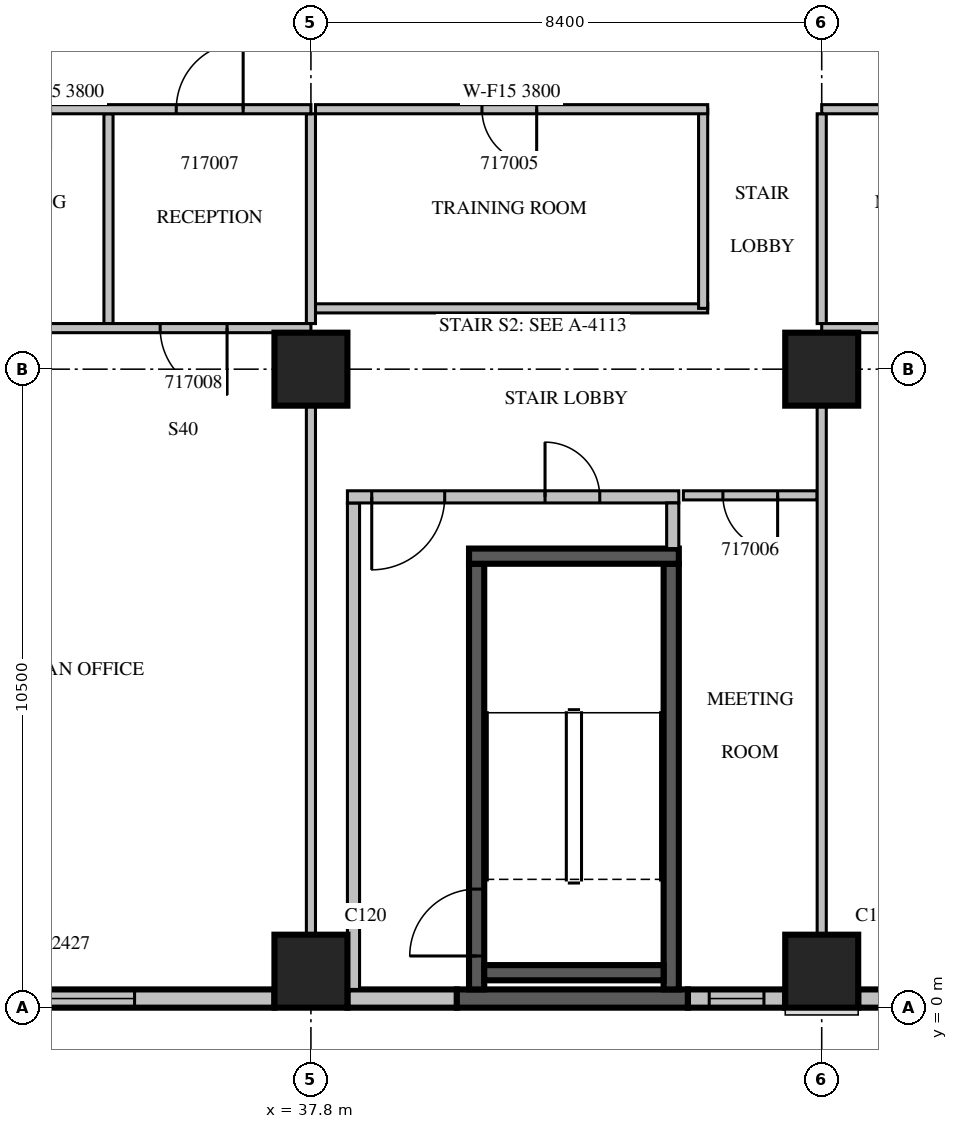
"""IFC4 building model, lengths in metres.
Left out: names, types, materials, properties, quantities, classifications, styles, units other than length and angle.
Written with IfcOpenShell. Run it as: python <this file> out.ifc"""

import sys

from ifc_helpers import new_model, si_unit, direction, frame, frame_2d, origin, origin_2d, place, context, subcontext, project, spatial, rectangle, extrude, source, transform, mapped, element, fill, save


model = new_model("IFC4")
c1 = context("Model", 3, precision=1e-05, world=origin(), true_north=direction((0.0, 1.0)))
c2 = subcontext(c1, "Body", "Model", "MODEL_VIEW")
j1 = project(units=[si_unit("LENGTHUNIT", "METRE"), si_unit("PLANEANGLEUNIT", "RADIAN")], contexts=[c1])
p1 = place(None, origin())
s1 = spatial("IfcSite", under=j1, at=p1, CompositionType="ELEMENT")
p2 = place(p1, origin())
s2 = spatial("IfcBuilding", under=s1, at=p2, CompositionType="ELEMENT")
p3 = place(p2, frame((0.0, 0.0, 82.5)))
s3 = spatial("IfcBuildingStorey", under=s2, at=p3, CompositionType="ELEMENT", Elevation=82.5)
m1 = source(origin(), c2, "Body", "SweptSolid", [
    extrude(rectangle(XDim=1.2, YDim=1.2, at=origin_2d()), origin(), (0.0, 0.0, 1.0), 4.2),
])
for number, where, z_axis, x_axis in (
    (1, (37.8, 0.6, 0.0), (0.0, 0.0, 1.0), (1.0, 0.0, 0.0)),
    (2, (46.2, 0.6, 0.0), (0.0, 0.0, 1.0), (1.0, 0.0, 0.0)),
    (3, (37.8, 10.5, 0.0), (0.0, 0.0, 1.0), (1.0, 0.0, 0.0)),
    (4, (46.2, 10.5, 0.0), (0.0, 0.0, 1.0), (1.0, 0.0, 0.0)),
):
    element("IfcColumn", number, at=place(p3, frame(where, z_axis=z_axis, x_axis=x_axis)), inside=s3, PredefinedType="COLUMN", context=c2, shape_type="MappedRepresentation", body=[
        mapped(m1, transform((0.0, 0.0, 0.0), scale=1.0)),
    ])
m2 = source(origin(), c2, "Body", "SweptSolid", [
    extrude(rectangle(XDim=7.2, YDim=0.3, at=frame_2d((3.6, 0.0))), origin(), (0.0, 0.0, 1.0), 3.8),
])
p4 = place(p3, frame((30.0, 0.15, 0.0), z_axis=(0.0, 0.0, 1.0), x_axis=(1.0, 0.0, 0.0)))
e5 = element("IfcWall", 5, at=p4, inside=s3, PredefinedType="STANDARD", context=c2, shape_type="MappedRepresentation", body=[
    mapped(m2, transform((0.0, 0.0, 0.0), scale=1.0)),
])
m3 = source(origin(), c2, "Body", "SweptSolid", [
    extrude(rectangle(XDim=2.4, YDim=2.7, at=frame_2d((1.2, 1.35))), frame((0.0, 0.16, 0.0), z_axis=(0.0, -1.0, 0.0), x_axis=(1.0, 0.0, 0.0)), (0.0, 0.0, 1.0), 0.32),
])
p5 = place(p4, frame((2.5, 0.0, 0.6)))
e6 = element("IfcOpeningElement", 6, at=p5, cuts=e5, PredefinedType="OPENING", context=c2, shape_type="MappedRepresentation", body=[
    mapped(m3, transform((0.0, 0.0, 0.0), scale=1.0)),
])
m4 = source(origin(), c2, "Body", "SweptSolid", [
    extrude(rectangle(XDim=1.8, YDim=0.3, at=frame_2d((0.9, 0.0))), origin(), (0.0, 0.0, 1.0), 3.8),
])
p6 = place(p3, frame((38.4, 0.15, 0.0), z_axis=(0.0, 0.0, 1.0), x_axis=(1.0, 0.0, 0.0)))
e7 = element("IfcWall", 7, at=p6, inside=s3, PredefinedType="STANDARD", context=c2, shape_type="MappedRepresentation", body=[
    mapped(m4, transform((0.0, 0.0, 0.0), scale=1.0)),
])
m5 = source(origin(), c2, "Body", "SweptSolid", [
    extrude(rectangle(XDim=3.8, YDim=0.3, at=frame_2d((1.9, 0.0))), origin(), (0.0, 0.0, 1.0), 3.8),
])
p7 = place(p3, frame((40.2, 0.15, 0.0), z_axis=(0.0, 0.0, 1.0), x_axis=(1.0, 0.0, 0.0)))
e8 = element("IfcWall", 8, at=p7, inside=s3, PredefinedType="SOLIDWALL", context=c2, shape_type="MappedRepresentation", body=[
    mapped(m5, transform((0.0, 0.0, 0.0), scale=1.0)),
])
m6 = source(origin(), c2, "Body", "SweptSolid", [
    extrude(rectangle(XDim=1.6, YDim=0.3, at=frame_2d((0.8, 0.0))), origin(), (0.0, 0.0, 1.0), 3.8),
])
p8 = place(p3, frame((44.0, 0.15, 0.0), z_axis=(0.0, 0.0, 1.0), x_axis=(1.0, 0.0, 0.0)))
e9 = element("IfcWall", 9, at=p8, inside=s3, PredefinedType="STANDARD", context=c2, shape_type="MappedRepresentation", body=[
    mapped(m6, transform((0.0, 0.0, 0.0), scale=1.0)),
])
m7 = source(origin(), c2, "Body", "SweptSolid", [
    extrude(rectangle(XDim=0.9, YDim=2.7, at=frame_2d((0.45, 1.35))), frame((0.0, 0.16, 0.0), z_axis=(0.0, -1.0, 0.0), x_axis=(1.0, 0.0, 0.0)), (0.0, 0.0, 1.0), 0.32),
])
p9 = place(p8, frame((0.35, 0.0, 0.6)))
e10 = element("IfcOpeningElement", 10, at=p9, cuts=e9, PredefinedType="OPENING", context=c2, shape_type="MappedRepresentation", body=[
    mapped(m7, transform((0.0, 0.0, 0.0), scale=1.0)),
])
m8 = source(origin(), c2, "Body", "SweptSolid", [
    extrude(rectangle(XDim=4.68, YDim=0.3, at=frame_2d((2.34, 0.0))), origin(), (0.0, 0.0, 1.0), 3.8),
])
p10 = place(p3, frame((46.8, 0.15, 0.0), z_axis=(0.0, 0.0, 1.0), x_axis=(1.0, 0.0, 0.0)))
e11 = element("IfcWall", 11, at=p10, inside=s3, PredefinedType="STANDARD", context=c2, shape_type="MappedRepresentation", body=[
    mapped(m8, transform((0.0, 0.0, 0.0), scale=1.0)),
])
m9 = source(origin(), c2, "Body", "SweptSolid", [
    extrude(rectangle(XDim=3.6, YDim=2.7, at=frame_2d((1.8, 1.35))), frame((0.0, 0.16, 0.0), z_axis=(0.0, -1.0, 0.0), x_axis=(1.0, 0.0, 0.0)), (0.0, 0.0, 1.0), 0.32),
])
p11 = place(p10, frame((0.54, 0.0, 0.6)))
e12 = element("IfcOpeningElement", 12, at=p11, cuts=e11, PredefinedType="OPENING", context=c2, shape_type="MappedRepresentation", body=[
    mapped(m9, transform((0.0, 0.0, 0.0), scale=1.0)),
])
m10 = source(origin(), c2, "Body", "SweptSolid", [
    extrude(rectangle(XDim=7.0, YDim=0.25, at=frame_2d((3.5, 0.0))), origin(), (0.0, 0.0, 1.0), 3.8),
])
p12 = place(p3, frame((40.525, 0.3, 0.0), z_axis=(0.0, 0.0, 1.0), x_axis=(0.0, 1.0, 0.0)))
e13 = element("IfcWall", 13, at=p12, inside=s3, PredefinedType="SOLIDWALL", context=c2, shape_type="MappedRepresentation", body=[
    mapped(m10, transform((0.0, 0.0, 0.0), scale=1.0)),
])
m11 = source(origin(), c2, "Body", "SweptSolid", [
    extrude(rectangle(XDim=1.1, YDim=2.1, at=frame_2d((0.55, 1.05))), frame((0.0, 0.135, 0.0), z_axis=(0.0, -1.0, 0.0), x_axis=(1.0, 0.0, 0.0)), (0.0, 0.0, 1.0), 0.27),
])
p13 = place(p12, frame((0.55, 0.0, 0.0)))
e14 = element("IfcOpeningElement", 14, at=p13, cuts=e13, PredefinedType="OPENING", context=c2, shape_type="MappedRepresentation", body=[
    mapped(m11, transform((0.0, 0.0, 0.0), scale=1.0)),
])
p14 = place(p3, frame((43.725, 0.3, 0.0), z_axis=(0.0, 0.0, 1.0), x_axis=(0.0, 1.0, 0.0)))
e15 = element("IfcWall", 15, at=p14, inside=s3, PredefinedType="SOLIDWALL", context=c2, shape_type="MappedRepresentation", body=[
    mapped(m10, transform((0.0, 0.0, 0.0), scale=1.0)),
])
m12 = source(origin(), c2, "Body", "SweptSolid", [
    extrude(rectangle(XDim=3.45, YDim=0.25, at=frame_2d((1.725, 0.0))), origin(), (0.0, 0.0, 1.0), 3.8),
])
p15 = place(p3, frame((40.4, 7.425, 0.0), z_axis=(0.0, 0.0, 1.0), x_axis=(1.0, 0.0, 0.0)))
e16 = element("IfcWall", 16, at=p15, inside=s3, PredefinedType="SOLIDWALL", context=c2, shape_type="MappedRepresentation", body=[
    mapped(m12, transform((0.0, 0.0, 0.0), scale=1.0)),
])
m13 = source(origin(), c2, "Body", "SweptSolid", [
    extrude(rectangle(XDim=2.95, YDim=0.25, at=frame_2d((1.475, 0.0))), origin(), (0.0, 0.0, 1.0), 3.8),
])
p16 = place(p3, frame((40.65, 0.575, 0.0), z_axis=(0.0, 0.0, 1.0), x_axis=(1.0, 0.0, 0.0)))
e17 = element("IfcWall", 17, at=p16, inside=s3, PredefinedType="SOLIDWALL", context=c2, shape_type="MappedRepresentation", body=[
    mapped(m13, transform((0.0, 0.0, 0.0), scale=1.0)),
])
m14 = source(origin(), c2, "Body", "SweptSolid", [
    extrude(rectangle(XDim=8.0, YDim=0.2, at=frame_2d((4.0, 0.0))), origin(), (0.0, 0.0, 1.0), 3.8),
])
p17 = place(p3, frame((38.5, 0.3, 0.0), z_axis=(0.0, 0.0, 1.0), x_axis=(0.0, 1.0, 0.0)))
e18 = element("IfcWall", 18, at=p17, inside=s3, PredefinedType="PARTITIONING", context=c2, shape_type="MappedRepresentation", body=[
    mapped(m14, transform((0.0, 0.0, 0.0), scale=1.0)),
])
m15 = source(origin(), c2, "Body", "SweptSolid", [
    extrude(rectangle(XDim=5.45, YDim=0.2, at=frame_2d((2.725, 0.0))), origin(), (0.0, 0.0, 1.0), 3.8),
])
p18 = place(p3, frame((38.4, 8.4, 0.0), z_axis=(0.0, 0.0, 1.0), x_axis=(1.0, 0.0, 0.0)))
e19 = element("IfcWall", 19, at=p18, inside=s3, PredefinedType="PARTITIONING", context=c2, shape_type="MappedRepresentation", body=[
    mapped(m15, transform((0.0, 0.0, 0.0), scale=1.0)),
])
m16 = source(origin(), c2, "Body", "SweptSolid", [
    extrude(rectangle(XDim=1.2, YDim=2.1, at=frame_2d((0.6, 1.05))), frame((0.0, 0.11, 0.0), z_axis=(0.0, -1.0, 0.0), x_axis=(1.0, 0.0, 0.0)), (0.0, 0.0, 1.0), 0.22),
])
p19 = place(p18, frame((0.4, 0.0, 0.0)))
e20 = element("IfcOpeningElement", 20, at=p19, cuts=e19, PredefinedType="OPENING", context=c2, shape_type="MappedRepresentation", body=[
    mapped(m16, transform((0.0, 0.0, 0.0), scale=1.0)),
])
m17 = source(origin(), c2, "Body", "SweptSolid", [
    extrude(rectangle(XDim=0.9, YDim=2.1, at=frame_2d((0.45, 1.05))), frame((0.0, 0.11, 0.0), z_axis=(0.0, -1.0, 0.0), x_axis=(1.0, 0.0, 0.0)), (0.0, 0.0, 1.0), 0.22),
])
p20 = place(p18, frame((3.25, 0.0, 0.0)))
e21 = element("IfcOpeningElement", 21, at=p20, cuts=e19, PredefinedType="OPENING", context=c2, shape_type="MappedRepresentation", body=[
    mapped(m17, transform((0.0, 0.0, 0.0), scale=1.0)),
])
m18 = source(origin(), c2, "Body", "SweptSolid", [
    extrude(rectangle(XDim=0.75, YDim=0.2, at=frame_2d((0.375, 0.0))), origin(), (0.0, 0.0, 1.0), 3.8),
])
p21 = place(p3, frame((43.75, 7.55, 0.0), z_axis=(0.0, 0.0, 1.0), x_axis=(0.0, 1.0, 0.0)))
e22 = element("IfcWall", 22, at=p21, inside=s3, PredefinedType="PARTITIONING", context=c2, shape_type="MappedRepresentation", body=[
    mapped(m18, transform((0.0, 0.0, 0.0), scale=1.0)),
])
m19 = source(origin(), c2, "Body", "SweptSolid", [
    extrude(rectangle(XDim=6.45, YDim=0.15, at=frame_2d((3.225, 0.0))), origin(), (0.0, 0.0, 1.0), 3.8),
])
p22 = place(p3, frame((37.875, 11.5, 0.0), z_axis=(0.0, 0.0, 1.0), x_axis=(1.0, 0.0, 0.0)))
e23 = element("IfcWall", 23, at=p22, inside=s3, PredefinedType="PARTITIONING", context=c2, shape_type="MappedRepresentation", body=[
    mapped(m19, transform((0.0, 0.0, 0.0), scale=1.0)),
])
p23 = place(p3, frame((44.25, 11.5, 0.0), z_axis=(0.0, 0.0, 1.0), x_axis=(0.0, 1.0, 0.0)))
e24 = element("IfcWall", 24, at=p23, inside=s3, PredefinedType="PARTITIONING", context=c2, shape_type="SweptSolid", body=[
    extrude(rectangle(XDim=3.275, YDim=0.15, at=frame_2d((1.637, 0.0))), origin(), (0.0, 0.0, 1.0), 3.8),
])
p24 = place(p3, frame((44.325, 14.775, 0.0), z_axis=(0.0, 0.0, 1.0), x_axis=(-1.0, 0.0, 0.0)))
e25 = element("IfcWall", 25, at=p24, inside=s3, PredefinedType="PARTITIONING", context=c2, shape_type="MappedRepresentation", body=[
    mapped(m19, transform((0.0, 0.0, 0.0), scale=1.0)),
])
m20 = source(origin(), c2, "Body", "SweptSolid", [
    extrude(rectangle(XDim=0.9, YDim=2.1, at=frame_2d((0.45, 1.05))), frame((0.0, 0.085, 0.0), z_axis=(0.0, -1.0, 0.0), x_axis=(1.0, 0.0, 0.0)), (0.0, 0.0, 1.0), 0.17),
])
p25 = place(p24, frame((2.812, 0.0, 0.0)))
e26 = element("IfcOpeningElement", 26, at=p25, cuts=e25, PredefinedType="OPENING", context=c2, shape_type="MappedRepresentation", body=[
    mapped(m20, transform((0.0, 0.0, 0.0), scale=1.0)),
])
m21 = source(origin(), c2, "Body", "SweptSolid", [
    extrude(rectangle(XDim=2.2, YDim=0.15, at=frame_2d((1.1, 0.0))), origin(), (0.0, 0.0, 1.0), 3.8),
])
p26 = place(p3, frame((46.125, 8.425, 0.0), z_axis=(0.0, 0.0, 1.0), x_axis=(-1.0, 0.0, 0.0)))
e27 = element("IfcWall", 27, at=p26, inside=s3, PredefinedType="PARTITIONING", context=c2, shape_type="MappedRepresentation", body=[
    mapped(m21, transform((0.0, 0.0, 0.0), scale=1.0)),
])
p27 = place(p26, frame((0.65, 0.0, 0.0)))
e28 = element("IfcOpeningElement", 28, at=p27, cuts=e27, PredefinedType="OPENING", context=c2, shape_type="MappedRepresentation", body=[
    mapped(m20, transform((0.0, 0.0, 0.0), scale=1.0)),
])
m22 = source(origin(), c2, "Body", "SweptSolid", [
    extrude(rectangle(XDim=3.45, YDim=0.15, at=frame_2d((1.725, 0.0))), origin(), (0.0, 0.0, 1.0), 3.8),
])
p28 = place(p3, frame((34.471, 11.25, 0.0), z_axis=(0.0, 0.0, 1.0), x_axis=(0.0, 1.0, 0.0)))
e29 = element("IfcWall", 29, at=p28, inside=s3, PredefinedType="PARTITIONING", context=c2, shape_type="MappedRepresentation", body=[
    mapped(m22, transform((0.0, 0.0, 0.0), scale=1.0)),
])
m23 = source(origin(), c2, "Body", "SweptSolid", [
    extrude(rectangle(XDim=8.702, YDim=0.15, at=frame_2d((4.351, 0.0))), origin(), (0.0, 0.0, 1.0), 3.8),
])
p29 = place(p3, frame((37.8, 1.199, 0.0), z_axis=(0.0, 0.0, 1.0), x_axis=(0.0, 1.0, 0.0)))
e30 = element("IfcWall", 30, at=p29, inside=s3, PredefinedType="PARTITIONING", context=c2, shape_type="MappedRepresentation", body=[
    mapped(m23, transform((0.0, 0.0, 0.0), scale=1.0)),
])
p30 = place(p3, frame((37.8, 11.25, 0.0), z_axis=(0.0, 0.0, 1.0), x_axis=(0.0, 1.0, 0.0)))
e31 = element("IfcWall", 31, at=p30, inside=s3, PredefinedType="PARTITIONING", context=c2, shape_type="MappedRepresentation", body=[
    mapped(m22, transform((0.0, 0.0, 0.0), scale=1.0)),
])
m24 = source(origin(), c2, "Body", "SweptSolid", [
    extrude(rectangle(XDim=8.4, YDim=0.15, at=frame_2d((4.2, 0.0))), origin(), (0.0, 0.0, 1.0), 3.8),
])
p31 = place(p3, frame((37.8, 11.175, 0.0), z_axis=(0.0, 0.0, 1.0), x_axis=(-1.0, 0.0, 0.0)))
e32 = element("IfcWall", 32, at=p31, inside=s3, PredefinedType="PARTITIONING", context=c2, shape_type="MappedRepresentation", body=[
    mapped(m24, transform((0.0, 0.0, 0.0), scale=1.0)),
])
m25 = source(origin(), c2, "Body", "SweptSolid", [
    extrude(rectangle(XDim=1.1, YDim=2.1, at=frame_2d((0.55, 1.05))), frame((0.0, 0.085, 0.0), z_axis=(0.0, -1.0, 0.0), x_axis=(1.0, 0.0, 0.0)), (0.0, 0.0, 1.0), 0.17),
])
p32 = place(p31, frame((1.379, 0.0, 0.0)))
e33 = element("IfcOpeningElement", 33, at=p32, cuts=e32, PredefinedType="OPENING", context=c2, shape_type="MappedRepresentation", body=[
    mapped(m25, transform((0.0, 0.0, 0.0), scale=1.0)),
])
p33 = place(p3, frame((46.2, 1.199, 0.0), z_axis=(0.0, 0.0, 1.0), x_axis=(0.0, 1.0, 0.0)))
e34 = element("IfcWall", 34, at=p33, inside=s3, PredefinedType="PARTITIONING", context=c2, shape_type="MappedRepresentation", body=[
    mapped(m23, transform((0.0, 0.0, 0.0), scale=1.0)),
])
p34 = place(p3, frame((46.2, 11.25, 0.0), z_axis=(0.0, 0.0, 1.0), x_axis=(0.0, 1.0, 0.0)))
e35 = element("IfcWall", 35, at=p34, inside=s3, PredefinedType="PARTITIONING", context=c2, shape_type="MappedRepresentation", body=[
    mapped(m22, transform((0.0, 0.0, 0.0), scale=1.0)),
])
m26 = source(origin(), c2, "Body", "SweptSolid", [
    extrude(rectangle(XDim=24.9, YDim=0.15, at=frame_2d((12.45, 0.0))), origin(), (0.0, 0.0, 1.0), 3.8),
])
p35 = place(p3, frame((71.1, 11.175, 0.0), z_axis=(0.0, 0.0, 1.0), x_axis=(-1.0, 0.0, 0.0)))
e36 = element("IfcWall", 36, at=p35, inside=s3, PredefinedType="PARTITIONING", context=c2, shape_type="MappedRepresentation", body=[
    mapped(m26, transform((0.0, 0.0, 0.0), scale=1.0)),
])
p36 = place(p35, frame((4.508, 0.0, 0.0)))
e37 = element("IfcOpeningElement", 37, at=p36, cuts=e36, PredefinedType="OPENING", context=c2, shape_type="MappedRepresentation", body=[
    mapped(m25, transform((0.0, 0.0, 0.0), scale=1.0)),
])
p37 = place(p35, frame((2.243, 0.0, 0.0)))
e38 = element("IfcOpeningElement", 38, at=p37, cuts=e36, PredefinedType="OPENING", context=c2, shape_type="MappedRepresentation", body=[
    mapped(m20, transform((0.0, 0.0, 0.0), scale=1.0)),
])
p38 = place(p3, frame((37.8, 14.775, 0.0), z_axis=(0.0, 0.0, 1.0), x_axis=(-1.0, 0.0, 0.0)))
e39 = element("IfcWall", 39, at=p38, inside=s3, PredefinedType="PARTITIONING", context=c2, shape_type="MappedRepresentation", body=[
    mapped(m24, transform((0.0, 0.0, 0.0), scale=1.0)),
])
p39 = place(p38, frame((1.115, 0.0, 0.0)))
e40 = element("IfcOpeningElement", 40, at=p39, cuts=e39, PredefinedType="OPENING", context=c2, shape_type="MappedRepresentation", body=[
    mapped(m25, transform((0.0, 0.0, 0.0), scale=1.0)),
])
p40 = place(p38, frame((6.818, 0.0, 0.0)))
e41 = element("IfcOpeningElement", 41, at=p40, cuts=e39, PredefinedType="OPENING", context=c2, shape_type="MappedRepresentation", body=[
    mapped(m20, transform((0.0, 0.0, 0.0), scale=1.0)),
])
p41 = place(p38, frame((4.282, 0.0, 0.0)))
e42 = element("IfcOpeningElement", 42, at=p41, cuts=e39, PredefinedType="OPENING", context=c2, shape_type="MappedRepresentation", body=[
    mapped(m20, transform((0.0, 0.0, 0.0), scale=1.0)),
])
p42 = place(p3, frame((71.1, 14.775, 0.0), z_axis=(0.0, 0.0, 1.0), x_axis=(-1.0, 0.0, 0.0)))
e43 = element("IfcWall", 43, at=p42, inside=s3, PredefinedType="PARTITIONING", context=c2, shape_type="MappedRepresentation", body=[
    mapped(m26, transform((0.0, 0.0, 0.0), scale=1.0)),
])
p43 = place(p42, frame((4.82, 0.0, 0.0)))
e44 = element("IfcOpeningElement", 44, at=p43, cuts=e43, PredefinedType="OPENING", context=c2, shape_type="MappedRepresentation", body=[
    mapped(m25, transform((0.0, 0.0, 0.0), scale=1.0)),
])
p44 = place(p42, frame((22.866, 0.0, 0.0)))
e45 = element("IfcOpeningElement", 45, at=p44, cuts=e43, PredefinedType="OPENING", context=c2, shape_type="MappedRepresentation", body=[
    mapped(m20, transform((0.0, 0.0, 0.0), scale=1.0)),
])
p45 = place(p42, frame((19.925, 0.0, 0.0)))
e46 = element("IfcOpeningElement", 46, at=p45, cuts=e43, PredefinedType="OPENING", context=c2, shape_type="MappedRepresentation", body=[
    mapped(m20, transform((0.0, 0.0, 0.0), scale=1.0)),
])
p46 = place(p42, frame((15.63, 0.0, 0.0)))
e47 = element("IfcOpeningElement", 47, at=p46, cuts=e43, PredefinedType="OPENING", context=c2, shape_type="MappedRepresentation", body=[
    mapped(m20, transform((0.0, 0.0, 0.0), scale=1.0)),
])
p47 = place(p42, frame((9.75, 0.0, 0.0)))
e48 = element("IfcOpeningElement", 48, at=p47, cuts=e43, PredefinedType="OPENING", context=c2, shape_type="MappedRepresentation", body=[
    mapped(m20, transform((0.0, 0.0, 0.0), scale=1.0)),
])
m27 = source(origin(), c2, "Body", "SweptSolid", [
    extrude(rectangle(XDim=1.2, YDim=2.1, at=frame_2d((0.6, 1.05))), frame((0.0, 0.085, 0.0), z_axis=(0.0, -1.0, 0.0), x_axis=(1.0, 0.0, 0.0)), (0.0, 0.0, 1.0), 0.17),
])
p48 = place(p42, frame((1.103, 0.0, 0.0)))
e49 = element("IfcOpeningElement", 49, at=p48, cuts=e43, PredefinedType="OPENING", context=c2, shape_type="MappedRepresentation", body=[
    mapped(m27, transform((0.0, 0.0, 0.0), scale=1.0)),
])
m28 = source(origin(), c2, "Body", "SweptSolid", [
    extrude(rectangle(XDim=2.4, YDim=2.7, at=frame_2d((1.2, 1.35))), frame((0.0, 0.03, 0.0), z_axis=(0.0, -1.0, 0.0), x_axis=(1.0, 0.0, 0.0)), (0.0, 0.0, 1.0), 0.06),
])
p49 = place(p5, origin())
e50 = element("IfcWindow", 50, at=p49, inside=s3, PartitioningType="SINGLE_PANEL", PredefinedType="WINDOW", context=c2, shape_type="MappedRepresentation", body=[
    mapped(m28, transform((0.0, 0.0, 0.0), scale=1.0)),
])
fill(e6, e50)
m29 = source(origin(), c2, "Body", "SweptSolid", [
    extrude(rectangle(XDim=0.9, YDim=2.7, at=frame_2d((0.45, 1.35))), frame((0.0, 0.03, 0.0), z_axis=(0.0, -1.0, 0.0), x_axis=(1.0, 0.0, 0.0)), (0.0, 0.0, 1.0), 0.06),
])
p50 = place(p9, origin())
e51 = element("IfcWindow", 51, at=p50, inside=s3, PartitioningType="SINGLE_PANEL", PredefinedType="WINDOW", context=c2, shape_type="MappedRepresentation", body=[
    mapped(m29, transform((0.0, 0.0, 0.0), scale=1.0)),
])
fill(e10, e51)
m30 = source(origin(), c2, "Body", "SweptSolid", [
    extrude(rectangle(XDim=1.1, YDim=2.1, at=frame_2d((0.55, 1.05))), frame((0.0, 0.025, 0.0), z_axis=(0.0, -1.0, 0.0), x_axis=(1.0, 0.0, 0.0)), (0.0, 0.0, 1.0), 0.05),
])
p51 = place(p13, origin())
e52 = element("IfcDoor", 52, at=p51, inside=s3, OperationType="SINGLE_SWING_LEFT", PredefinedType="DOOR", context=c2, shape_type="MappedRepresentation", body=[
    mapped(m30, transform((0.0, 0.0, 0.0), scale=1.0)),
])
fill(e14, e52)
m31 = source(origin(), c2, "Body", "SweptSolid", [
    extrude(rectangle(XDim=1.2, YDim=2.1, at=frame_2d((0.6, 1.05))), frame((0.0, 0.025, 0.0), z_axis=(0.0, -1.0, 0.0), x_axis=(1.0, 0.0, 0.0)), (0.0, 0.0, 1.0), 0.05),
])
p52 = place(p19, origin())
e53 = element("IfcDoor", 53, at=p52, inside=s3, OperationType="SINGLE_SWING_RIGHT", PredefinedType="DOOR", context=c2, shape_type="MappedRepresentation", body=[
    mapped(m31, transform((0.0, 0.0, 0.0), scale=1.0)),
])
fill(e20, e53)
m32 = source(origin(), c2, "Body", "SweptSolid", [
    extrude(rectangle(XDim=0.9, YDim=2.1, at=frame_2d((0.45, 1.05))), frame((0.0, 0.025, 0.0), z_axis=(0.0, -1.0, 0.0), x_axis=(1.0, 0.0, 0.0)), (0.0, 0.0, 1.0), 0.05),
])
p53 = place(p20, origin())
e54 = element("IfcDoor", 54, at=p53, inside=s3, OperationType="SINGLE_SWING_LEFT", PredefinedType="DOOR", context=c2, shape_type="MappedRepresentation", body=[
    mapped(m32, transform((0.0, 0.0, 0.0), scale=1.0)),
])
fill(e21, e54)
p54 = place(p25, origin())
e55 = element("IfcDoor", 55, at=p54, inside=s3, OperationType="SINGLE_SWING_LEFT", PredefinedType="DOOR", context=c2, shape_type="MappedRepresentation", body=[
    mapped(m32, transform((0.0, 0.0, 0.0), scale=1.0)),
])
fill(e26, e55)
p55 = place(p27, origin())
e56 = element("IfcDoor", 56, at=p55, inside=s3, OperationType="SINGLE_SWING_LEFT", PredefinedType="DOOR", context=c2, shape_type="MappedRepresentation", body=[
    mapped(m32, transform((0.0, 0.0, 0.0), scale=1.0)),
])
fill(e28, e56)
p56 = place(p39, origin())
e57 = element("IfcDoor", 57, at=p56, inside=s3, OperationType="SINGLE_SWING_RIGHT", PredefinedType="DOOR", context=c2, shape_type="MappedRepresentation", body=[
    mapped(m30, transform((0.0, 0.0, 0.0), scale=1.0)),
])
fill(e40, e57)
p57 = place(p32, origin())
e58 = element("IfcDoor", 58, at=p57, inside=s3, OperationType="SINGLE_SWING_LEFT", PredefinedType="DOOR", context=c2, shape_type="MappedRepresentation", body=[
    mapped(m30, transform((0.0, 0.0, 0.0), scale=1.0)),
])
fill(e33, e58)
save(model, sys.argv[1])
